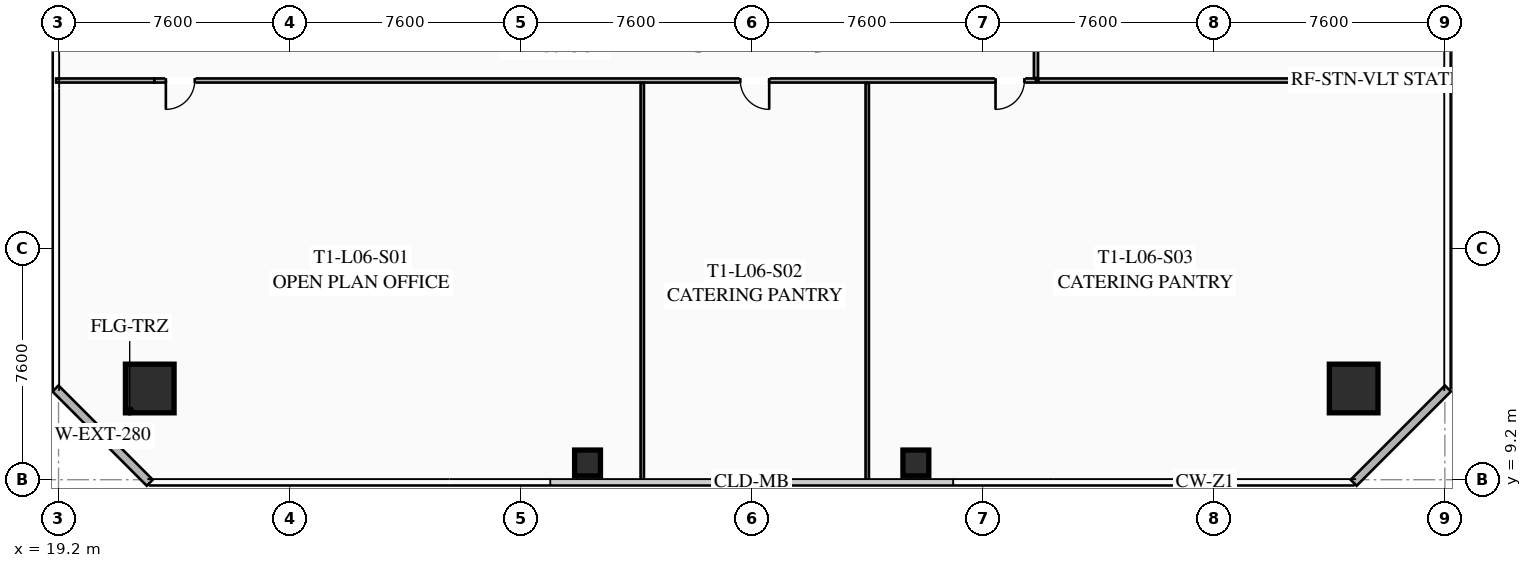
"""IFC4 building model, lengths in metres.
Left out: names, types, materials, properties, quantities, classifications, styles, units other than length and angle.
Written with IfcOpenShell. Run it as: python <this file> out.ifc"""

import sys

from ifc_helpers import new_model, si_unit, direction, frame, frame_2d, origin, origin_2d, place, context, subcontext, project, spatial, rectangle, hollow_rectangle, extrude, element, fill, save


model = new_model("IFC4")
c1 = context("Model", 3, precision=1e-05, world=origin(), true_north=direction((0.0, 1.0)))
c2 = subcontext(c1, "Body", "Model", "MODEL_VIEW")
j1 = project(units=[si_unit("LENGTHUNIT", "METRE"), si_unit("PLANEANGLEUNIT", "RADIAN")], contexts=[c1])
p1 = place(None, origin())
s1 = spatial("IfcSite", under=j1, at=p1, CompositionType="ELEMENT")
p2 = place(p1, origin())
s2 = spatial("IfcBuilding", under=s1, at=p2, CompositionType="ELEMENT")
p3 = place(p2, frame((0.0, 0.0, 28.15)))
s3 = spatial("IfcBuildingStorey", under=s2, at=p3, CompositionType="ELEMENT", Elevation=28.15)
for number, where, z_axis, x_axis in (
    (1, (22.2, 12.2, 0.0), (0.0, 0.0, 1.0), (1.0, 0.0, 0.0)),
    (2, (61.8, 12.2, 0.0), (0.0, 0.0, 1.0), (1.0, 0.0, 0.0)),
):
    element("IfcColumn", number, at=place(p3, frame(where, z_axis=z_axis, x_axis=x_axis)), inside=s3, PredefinedType="COLUMN", context=c2, shape_type="SweptSolid", body=[
        extrude(hollow_rectangle(XDim=1.6, YDim=1.6, WallThickness=0.06, at=origin_2d()), origin(), (0.0, 0.0, 1.0), 3.35),
    ])
for number, where, z_axis, x_axis in (
    (3, (36.6, 9.75, 0.0), (0.0, 0.0, 1.0), (1.0, 0.0, 0.0)),
    (4, (47.4, 9.75, 0.0), (0.0, 0.0, 1.0), (1.0, 0.0, 0.0)),
):
    element("IfcColumn", number, at=place(p3, frame(where, z_axis=z_axis, x_axis=x_axis)), inside=s3, PredefinedType="COLUMN", context=c2, shape_type="SweptSolid", body=[
        extrude(hollow_rectangle(XDim=0.85, YDim=0.85, WallThickness=0.035, at=origin_2d()), origin(), (0.0, 0.0, 1.0), 3.35),
    ])
for number, where, z_axis, x_axis in (
    (5, (22.2, 9.1, 0.0), (0.0, 0.0, 1.0), (-0.707, 0.707, 0.0)),
    (6, (64.9, 12.2, 0.0), (0.0, 0.0, 1.0), (-0.707, -0.707, 0.0)),
):
    element("IfcWall", number, at=place(p3, frame(where, z_axis=z_axis, x_axis=x_axis)), inside=s3, PredefinedType="SOLIDWALL", context=c2, shape_type="SweptSolid", body=[
        extrude(rectangle(XDim=4.384, YDim=0.28, at=frame_2d((2.192, 0.0))), origin(), (0.0, 0.0, 1.0), 3.35),
    ])
p4 = place(p3, frame((51.35, 22.33, 0.0), z_axis=(0.0, 0.0, 1.0), x_axis=(-1.0, 0.0, 0.0)))
e7 = element("IfcWall", 7, at=p4, inside=s3, PredefinedType="PARTITIONING", context=c2, shape_type="SweptSolid", body=[
    extrude(rectangle(XDim=29.0, YDim=0.135, at=frame_2d((14.5, 0.0))), origin(), (0.0, 0.0, 1.0), 2.703),
])
p5 = place(p4, frame((27.67, 0.0, 0.0)))
e8 = element("IfcOpeningElement", 8, at=p5, cuts=e7, PredefinedType="OPENING", context=c2, shape_type="SweptSolid", body=[
    extrude(rectangle(XDim=0.95, YDim=2.05, at=frame_2d((0.475, 1.025))), frame((0.0, 0.077, 0.0), z_axis=(0.0, -1.0, 0.0), x_axis=(1.0, 0.0, 0.0)), (0.0, 0.0, 1.0), 0.155),
])
p6 = place(p4, frame((8.775, 0.0, 0.0)))
e9 = element("IfcOpeningElement", 9, at=p6, cuts=e7, PredefinedType="OPENING", context=c2, shape_type="SweptSolid", body=[
    extrude(rectangle(XDim=0.95, YDim=2.05, at=frame_2d((0.475, 1.025))), frame((0.0, 0.077, 0.0), z_axis=(0.0, -1.0, 0.0), x_axis=(1.0, 0.0, 0.0)), (0.0, 0.0, 1.0), 0.155),
])
p7 = place(p4, frame((0.38, 0.0, 0.0)))
e10 = element("IfcOpeningElement", 10, at=p7, cuts=e7, PredefinedType="OPENING", context=c2, shape_type="SweptSolid", body=[
    extrude(rectangle(XDim=0.95, YDim=2.05, at=frame_2d((0.475, 1.025))), frame((0.0, 0.077, 0.0), z_axis=(0.0, -1.0, 0.0), x_axis=(1.0, 0.0, 0.0)), (0.0, 0.0, 1.0), 0.155),
])
p8 = place(p3, frame((19.12, 22.33, 0.0), z_axis=(0.0, 0.0, 1.0), x_axis=(1.0, 0.0, 0.0)))
e11 = element("IfcWall", 11, at=p8, inside=s3, PredefinedType="PARTITIONING", context=c2, shape_type="SweptSolid", body=[
    extrude(rectangle(XDim=3.23, YDim=0.135, at=frame_2d((1.615, 0.0))), origin(), (0.0, 0.0, 1.0), 2.703),
])
for number, where, z_axis, x_axis in (
    (12, (38.4, 9.12, 0.0), (0.0, 0.0, 1.0), (0.0, 1.0, 0.0)),
    (13, (45.8, 9.12, 0.0), (0.0, 0.0, 1.0), (0.0, 1.0, 0.0)),
):
    element("IfcWall", number, at=place(p3, frame(where, z_axis=z_axis, x_axis=x_axis)), inside=s3, PredefinedType="PARTITIONING", context=c2, shape_type="SweptSolid", body=[
        extrude(rectangle(XDim=13.13, YDim=0.11, at=frame_2d((6.565, 0.0))), origin(), (0.0, 0.0, 1.0), 2.703),
    ])
p9 = place(p3, frame((51.35, 41.27, 0.0), z_axis=(0.0, 0.0, 1.0), x_axis=(0.0, -1.0, 0.0)))
e14 = element("IfcWall", 14, at=p9, inside=s3, PredefinedType="PARTITIONING", context=c2, shape_type="SweptSolid", body=[
    extrude(rectangle(XDim=18.86, YDim=0.135, at=frame_2d((9.43, 0.0))), origin(), (0.0, 0.0, 1.0), 2.703),
])
p10 = place(p9, frame((8.579, 0.0, 0.0)))
e15 = element("IfcOpeningElement", 15, at=p10, cuts=e14, PredefinedType="OPENING", context=c2, shape_type="SweptSolid", body=[
    extrude(rectangle(XDim=0.95, YDim=2.05, at=frame_2d((0.475, 1.025))), frame((0.0, 0.077, 0.0), z_axis=(0.0, -1.0, 0.0), x_axis=(1.0, 0.0, 0.0)), (0.0, 0.0, 1.0), 0.155),
])
p11 = place(p3, frame((51.43, 22.33, 0.0), z_axis=(0.0, 0.0, 1.0), x_axis=(1.0, 0.0, 0.0)))
e16 = element("IfcWall", 16, at=p11, inside=s3, PredefinedType="PARTITIONING", context=c2, shape_type="SweptSolid", body=[
    extrude(rectangle(XDim=13.45, YDim=0.135, at=frame_2d((6.725, 0.0))), origin(), (0.0, 0.0, 1.0), 2.703),
])
p12 = place(p5, origin())
e17 = element("IfcDoor", 17, at=p12, inside=s3, OperationType="SINGLE_SWING_RIGHT", PredefinedType="DOOR", context=c2, shape_type="SweptSolid", body=[
    extrude(rectangle(XDim=0.95, YDim=2.05, at=frame_2d((0.475, 1.025))), frame((0.0, 0.025, 0.0), z_axis=(0.0, -1.0, 0.0), x_axis=(1.0, 0.0, 0.0)), (0.0, 0.0, 1.0), 0.05),
])
fill(e8, e17)
p13 = place(p6, origin())
e18 = element("IfcDoor", 18, at=p13, inside=s3, OperationType="SINGLE_SWING_LEFT", PredefinedType="DOOR", context=c2, shape_type="SweptSolid", body=[
    extrude(rectangle(XDim=0.95, YDim=2.05, at=frame_2d((0.475, 1.025))), frame((0.0, 0.025, 0.0), z_axis=(0.0, -1.0, 0.0), x_axis=(1.0, 0.0, 0.0)), (0.0, 0.0, 1.0), 0.05),
])
fill(e9, e18)
p14 = place(p7, origin())
e19 = element("IfcDoor", 19, at=p14, inside=s3, OperationType="SINGLE_SWING_RIGHT", PredefinedType="DOOR", context=c2, shape_type="SweptSolid", body=[
    extrude(rectangle(XDim=0.95, YDim=2.05, at=frame_2d((0.475, 1.025))), frame((0.0, 0.025, 0.0), z_axis=(0.0, -1.0, 0.0), x_axis=(1.0, 0.0, 0.0)), (0.0, 0.0, 1.0), 0.05),
])
fill(e10, e19)
save(model, sys.argv[1])
